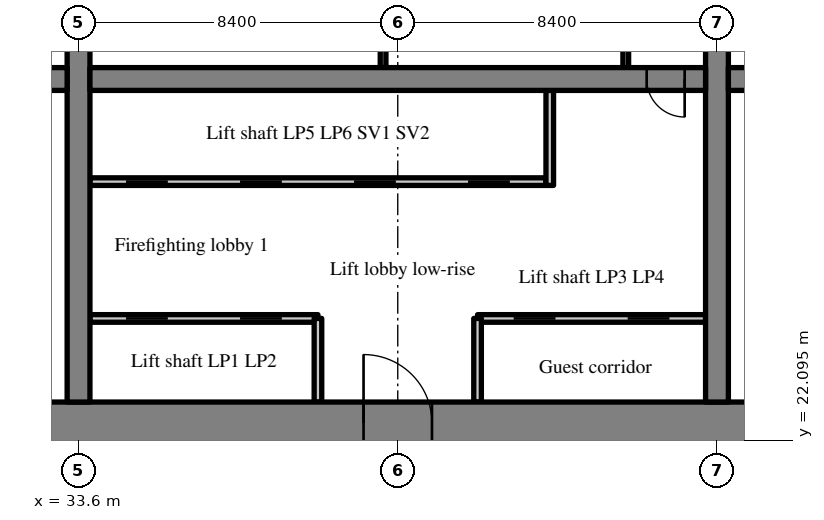
"""IFC4 building model, lengths in metres.
Left out: names, types, materials, properties, quantities, classifications, styles, units other than length and angle.
Written with IfcOpenShell. Run it as: python <this file> out.ifc"""

import sys

from ifc_helpers import new_model, si_unit, direction, frame, frame_2d, origin, place, context, subcontext, project, spatial, rectangle, extrude, source, transform, mapped, element, fill, save


model = new_model("IFC4")
c1 = context("Model", 3, precision=1e-05, world=origin(), true_north=direction((0.0, 1.0)))
c2 = subcontext(c1, "Body", "Model", "MODEL_VIEW")
j1 = project(units=[si_unit("LENGTHUNIT", "METRE"), si_unit("PLANEANGLEUNIT", "RADIAN")], contexts=[c1])
p1 = place(None, origin())
s1 = spatial("IfcSite", under=j1, at=p1, CompositionType="ELEMENT")
p2 = place(p1, origin())
s2 = spatial("IfcBuilding", under=s1, at=p2, CompositionType="ELEMENT")
p3 = place(p2, frame((0.0, 0.0, 31.6)))
s3 = spatial("IfcBuildingStorey", under=s2, at=p3, CompositionType="ELEMENT", Elevation=31.6)
m1 = source(origin(), c2, "Body", "SweptSolid", [
    extrude(rectangle(XDim=50.4, YDim=1.1, at=frame_2d((25.2, 0.0))), origin(), (0.0, 0.0, 1.0), 3.52),
])
p4 = place(p3, frame((25.2, 22.55, 0.0), z_axis=(0.0, 0.0, 1.0), x_axis=(1.0, 0.0, 0.0)))
e1 = element("IfcWall", 1, at=p4, inside=s3, PredefinedType="SHEAR", context=c2, shape_type="MappedRepresentation", body=[
    mapped(m1, transform((0.0, 0.0, 0.0), scale=1.0)),
])
m2 = source(origin(), c2, "Body", "SweptSolid", [
    extrude(rectangle(XDim=1.8, YDim=2.1, at=frame_2d((0.9, 1.05))), frame((0.0, 0.56, 0.0), z_axis=(0.0, -1.0, 0.0), x_axis=(1.0, 0.0, 0.0)), (0.0, 0.0, 1.0), 1.12),
])
p5 = place(p4, frame((15.9, 0.0, 0.0)))
e2 = element("IfcOpeningElement", 2, at=p5, cuts=e1, PredefinedType="OPENING", context=c2, shape_type="MappedRepresentation", body=[
    mapped(m2, transform((0.0, 0.0, 0.0), scale=1.0)),
])
m3 = source(origin(), c2, "Body", "SweptSolid", [
    extrude(rectangle(XDim=1.2, YDim=2.1, at=frame_2d((0.6, 1.05))), frame((0.0, 0.56, 0.0), z_axis=(0.0, -1.0, 0.0), x_axis=(1.0, 0.0, 0.0)), (0.0, 0.0, 1.0), 1.12),
])
p6 = place(p4, frame((27.0, 0.0, 0.0)))
e3 = element("IfcOpeningElement", 3, at=p6, cuts=e1, PredefinedType="OPENING", context=c2, shape_type="MappedRepresentation", body=[
    mapped(m3, transform((0.0, 0.0, 0.0), scale=1.0)),
])
m4 = source(origin(), c2, "Body", "SweptSolid", [
    extrude(rectangle(XDim=0.9, YDim=2.1, at=frame_2d((0.45, 1.05))), frame((0.0, 0.56, 0.0), z_axis=(0.0, -1.0, 0.0), x_axis=(1.0, 0.0, 0.0)), (0.0, 0.0, 1.0), 1.12),
])
p7 = place(p4, frame((32.25, 0.0, 0.0)))
e4 = element("IfcOpeningElement", 4, at=p7, cuts=e1, PredefinedType="OPENING", context=c2, shape_type="MappedRepresentation", body=[
    mapped(m4, transform((0.0, 0.0, 0.0), scale=1.0)),
])
p8 = place(p4, frame((38.25, 0.0, 0.0)))
e5 = element("IfcOpeningElement", 5, at=p8, cuts=e1, PredefinedType="OPENING", context=c2, shape_type="MappedRepresentation", body=[
    mapped(m4, transform((0.0, 0.0, 0.0), scale=1.0)),
])
p9 = place(p4, frame((6.425, 0.0, 0.0)))
e6 = element("IfcOpeningElement", 6, at=p9, cuts=e1, PredefinedType="OPENING", context=c2, shape_type="MappedRepresentation", body=[
    mapped(m3, transform((0.0, 0.0, 0.0), scale=1.0)),
])
p10 = place(p4, frame((47.675, 0.0, 0.0)))
e7 = element("IfcOpeningElement", 7, at=p10, cuts=e1, PredefinedType="OPENING", context=c2, shape_type="MappedRepresentation", body=[
    mapped(m3, transform((0.0, 0.0, 0.0), scale=1.0)),
])
m5 = source(origin(), c2, "Body", "SweptSolid", [
    extrude(rectangle(XDim=17.8, YDim=0.6, at=frame_2d((8.9, 0.0))), origin(), (0.0, 0.0, 1.0), 3.52),
])
p11 = place(p3, frame((33.6, 23.1, 0.0), z_axis=(0.0, 0.0, 1.0), x_axis=(0.0, 1.0, 0.0)))
e8 = element("IfcWall", 8, at=p11, inside=s3, PredefinedType="SHEAR", context=c2, shape_type="MappedRepresentation", body=[
    mapped(m5, transform((0.0, 0.0, 0.0), scale=1.0)),
])
m6 = source(origin(), c2, "Body", "SweptSolid", [
    extrude(rectangle(XDim=1.1, YDim=2.1, at=frame_2d((0.55, 1.05))), frame((0.0, 0.31, 0.0), z_axis=(0.0, -1.0, 0.0), x_axis=(1.0, 0.0, 0.0)), (0.0, 0.0, 1.0), 0.62),
])
p12 = place(p11, frame((12.35, 0.0, 0.0)))
e9 = element("IfcOpeningElement", 9, at=p12, cuts=e8, PredefinedType="OPENING", context=c2, shape_type="MappedRepresentation", body=[
    mapped(m6, transform((0.0, 0.0, 0.0), scale=1.0)),
])
p13 = place(p3, frame((50.4, 23.1, 0.0), z_axis=(0.0, 0.0, 1.0), x_axis=(0.0, 1.0, 0.0)))
e10 = element("IfcWall", 10, at=p13, inside=s3, PredefinedType="SHEAR", context=c2, shape_type="MappedRepresentation", body=[
    mapped(m5, transform((0.0, 0.0, 0.0), scale=1.0)),
])
p14 = place(p13, frame((12.35, 0.0, 0.0)))
e11 = element("IfcOpeningElement", 11, at=p14, cuts=e10, PredefinedType="OPENING", context=c2, shape_type="MappedRepresentation", body=[
    mapped(m6, transform((0.0, 0.0, 0.0), scale=1.0)),
])
m7 = source(origin(), c2, "Body", "SweptSolid", [
    extrude(rectangle(XDim=7.0, YDim=0.6, at=frame_2d((3.5, 0.0))), origin(), (0.0, 0.0, 1.0), 3.52),
])
p15 = place(p3, frame((26.3, 31.6, 0.0), z_axis=(0.0, 0.0, 1.0), x_axis=(1.0, 0.0, 0.0)))
e12 = element("IfcWall", 12, at=p15, inside=s3, PredefinedType="SHEAR", context=c2, shape_type="MappedRepresentation", body=[
    mapped(m7, transform((0.0, 0.0, 0.0), scale=1.0)),
])
p16 = place(p15, frame((5.375, 0.0, 0.0)))
e13 = element("IfcOpeningElement", 13, at=p16, cuts=e12, PredefinedType="OPENING", context=c2, shape_type="MappedRepresentation", body=[
    mapped(m6, transform((0.0, 0.0, 0.0), scale=1.0)),
])
m8 = source(origin(), c2, "Body", "SweptSolid", [
    extrude(rectangle(XDim=16.2, YDim=0.6, at=frame_2d((8.1, 0.0))), origin(), (0.0, 0.0, 1.0), 3.52),
])
p17 = place(p3, frame((33.9, 31.6, 0.0), z_axis=(0.0, 0.0, 1.0), x_axis=(1.0, 0.0, 0.0)))
e14 = element("IfcWall", 14, at=p17, inside=s3, PredefinedType="SHEAR", context=c2, shape_type="MappedRepresentation", body=[
    mapped(m8, transform((0.0, 0.0, 0.0), scale=1.0)),
])
m9 = source(origin(), c2, "Body", "SweptSolid", [
    extrude(rectangle(XDim=1.0, YDim=2.1, at=frame_2d((0.5, 1.05))), frame((0.0, 0.31, 0.0), z_axis=(0.0, -1.0, 0.0), x_axis=(1.0, 0.0, 0.0)), (0.0, 0.0, 1.0), 0.62),
])
p18 = place(p17, frame((14.65, 0.0, 0.0)))
e15 = element("IfcOpeningElement", 15, at=p18, cuts=e14, PredefinedType="OPENING", context=c2, shape_type="MappedRepresentation", body=[
    mapped(m9, transform((0.0, 0.0, 0.0), scale=1.0)),
])
m10 = source(origin(), c2, "Body", "SweptSolid", [
    extrude(rectangle(XDim=16.2, YDim=0.6, at=frame_2d((8.1, 0.0))), origin(), (0.0, 0.0, 1.0), 3.52),
])
p19 = place(p3, frame((50.7, 31.6, 0.0), z_axis=(0.0, 0.0, 1.0), x_axis=(1.0, 0.0, 0.0)))
e16 = element("IfcWall", 16, at=p19, inside=s3, PredefinedType="SHEAR", context=c2, shape_type="MappedRepresentation", body=[
    mapped(m10, transform((0.0, 0.0, 0.0), scale=1.0)),
])
p20 = place(p19, frame((0.55, 0.0, 0.0)))
e17 = element("IfcOpeningElement", 17, at=p20, cuts=e16, PredefinedType="OPENING", context=c2, shape_type="MappedRepresentation", body=[
    mapped(m9, transform((0.0, 0.0, 0.0), scale=1.0)),
])
m11 = source(origin(), c2, "Body", "SweptSolid", [
    extrude(rectangle(XDim=6.0, YDim=0.2, at=frame_2d((3.0, 0.0))), origin(), (0.0, 0.0, 1.0), 3.52),
])
p21 = place(p3, frame((33.9, 25.3, 0.0), z_axis=(0.0, 0.0, 1.0), x_axis=(1.0, 0.0, 0.0)))
e18 = element("IfcWall", 18, at=p21, inside=s3, PredefinedType="SOLIDWALL", context=c2, shape_type="MappedRepresentation", body=[
    mapped(m11, transform((0.0, 0.0, 0.0), scale=1.0)),
])
m12 = source(origin(), c2, "Body", "SweptSolid", [
    extrude(rectangle(XDim=1.1, YDim=2.1, at=frame_2d((0.55, 1.05))), frame((0.0, 0.11, 0.0), z_axis=(0.0, -1.0, 0.0), x_axis=(1.0, 0.0, 0.0)), (0.0, 0.0, 1.0), 0.22),
])
p22 = place(p21, frame((0.95, 0.0, 0.0)))
e19 = element("IfcOpeningElement", 19, at=p22, cuts=e18, PredefinedType="OPENING", context=c2, shape_type="MappedRepresentation", body=[
    mapped(m12, transform((0.0, 0.0, 0.0), scale=1.0)),
])
p23 = place(p21, frame((3.95, 0.0, 0.0)))
e20 = element("IfcOpeningElement", 20, at=p23, cuts=e18, PredefinedType="OPENING", context=c2, shape_type="MappedRepresentation", body=[
    mapped(m12, transform((0.0, 0.0, 0.0), scale=1.0)),
])
p24 = place(p3, frame((44.1, 25.3, 0.0), z_axis=(0.0, 0.0, 1.0), x_axis=(1.0, 0.0, 0.0)))
e21 = element("IfcWall", 21, at=p24, inside=s3, PredefinedType="SOLIDWALL", context=c2, shape_type="MappedRepresentation", body=[
    mapped(m11, transform((0.0, 0.0, 0.0), scale=1.0)),
])
p25 = place(p24, frame((0.95, 0.0, 0.0)))
e22 = element("IfcOpeningElement", 22, at=p25, cuts=e21, PredefinedType="OPENING", context=c2, shape_type="MappedRepresentation", body=[
    mapped(m12, transform((0.0, 0.0, 0.0), scale=1.0)),
])
p26 = place(p24, frame((3.95, 0.0, 0.0)))
e23 = element("IfcOpeningElement", 23, at=p26, cuts=e21, PredefinedType="OPENING", context=c2, shape_type="MappedRepresentation", body=[
    mapped(m12, transform((0.0, 0.0, 0.0), scale=1.0)),
])
m13 = source(origin(), c2, "Body", "SweptSolid", [
    extrude(rectangle(XDim=12.0, YDim=0.2, at=frame_2d((6.0, 0.0))), origin(), (0.0, 0.0, 1.0), 3.52),
])
p27 = place(p3, frame((33.9, 28.9, 0.0), z_axis=(0.0, 0.0, 1.0), x_axis=(1.0, 0.0, 0.0)))
e24 = element("IfcWall", 24, at=p27, inside=s3, PredefinedType="SOLIDWALL", context=c2, shape_type="MappedRepresentation", body=[
    mapped(m13, transform((0.0, 0.0, 0.0), scale=1.0)),
])
p28 = place(p27, frame((0.95, 0.0, 0.0)))
e25 = element("IfcOpeningElement", 25, at=p28, cuts=e24, PredefinedType="OPENING", context=c2, shape_type="MappedRepresentation", body=[
    mapped(m12, transform((0.0, 0.0, 0.0), scale=1.0)),
])
p29 = place(p27, frame((3.95, 0.0, 0.0)))
e26 = element("IfcOpeningElement", 26, at=p29, cuts=e24, PredefinedType="OPENING", context=c2, shape_type="MappedRepresentation", body=[
    mapped(m12, transform((0.0, 0.0, 0.0), scale=1.0)),
])
p30 = place(p27, frame((6.95, 0.0, 0.0)))
e27 = element("IfcOpeningElement", 27, at=p30, cuts=e24, PredefinedType="OPENING", context=c2, shape_type="MappedRepresentation", body=[
    mapped(m12, transform((0.0, 0.0, 0.0), scale=1.0)),
])
p31 = place(p27, frame((9.95, 0.0, 0.0)))
e28 = element("IfcOpeningElement", 28, at=p31, cuts=e24, PredefinedType="OPENING", context=c2, shape_type="MappedRepresentation", body=[
    mapped(m12, transform((0.0, 0.0, 0.0), scale=1.0)),
])
m14 = source(origin(), c2, "Body", "SweptSolid", [
    extrude(rectangle(XDim=2.2, YDim=0.2, at=frame_2d((1.1, 0.0))), origin(), (0.0, 0.0, 1.0), 3.52),
])
for number, where, z_axis, x_axis in (
    (29, (39.9, 23.1, 0.0), (0.0, 0.0, 1.0), (0.0, 1.0, 0.0)),
    (30, (44.1, 23.1, 0.0), (0.0, 0.0, 1.0), (0.0, 1.0, 0.0)),
):
    element("IfcWall", number, at=place(p3, frame(where, z_axis=z_axis, x_axis=x_axis)), inside=s3, PredefinedType="SOLIDWALL", context=c2, shape_type="MappedRepresentation", body=[
        mapped(m14, transform((0.0, 0.0, 0.0), scale=1.0)),
    ])
m15 = source(origin(), c2, "Body", "SweptSolid", [
    extrude(rectangle(XDim=2.5, YDim=0.2, at=frame_2d((1.25, 0.0))), origin(), (0.0, 0.0, 1.0), 3.52),
])
p32 = place(p3, frame((46.0, 28.8, 0.0), z_axis=(0.0, 0.0, 1.0), x_axis=(0.0, 1.0, 0.0)))
e31 = element("IfcWall", 31, at=p32, inside=s3, PredefinedType="SOLIDWALL", context=c2, shape_type="MappedRepresentation", body=[
    mapped(m15, transform((0.0, 0.0, 0.0), scale=1.0)),
])
m16 = source(origin(), c2, "Body", "SweptSolid", [
    extrude(rectangle(XDim=3.1, YDim=0.15, at=frame_2d((1.55, 0.0))), origin(), (0.0, 0.0, 1.0), 3.52),
])
for number, where, z_axis, x_axis in (
    (32, (48.0, 31.9, 0.0), (0.0, 0.0, 1.0), (0.0, 1.0, 0.0)),
    (33, (41.614, 31.9, 0.0), (0.0, 0.0, 1.0), (0.0, 1.0, 0.0)),
):
    element("IfcWall", number, at=place(p3, frame(where, z_axis=z_axis, x_axis=x_axis)), inside=s3, PredefinedType="PARTITIONING", context=c2, shape_type="MappedRepresentation", body=[
        mapped(m16, transform((0.0, 0.0, 0.0), scale=1.0)),
    ])
m17 = source(origin(), c2, "Body", "SweptSolid", [
    extrude(rectangle(XDim=1.8, YDim=2.1, at=frame_2d((0.9, 1.05))), frame((0.0, 0.325, 0.0), z_axis=(0.0, -1.0, 0.0), x_axis=(1.0, 0.0, 0.0)), (0.0, 0.0, 1.0), 0.05),
])
p33 = place(p5, origin())
e34 = element("IfcDoor", 34, at=p33, inside=s3, OperationType="DOUBLE_DOOR_SINGLE_SWING", PredefinedType="DOOR", context=c2, shape_type="MappedRepresentation", body=[
    mapped(m17, transform((0.0, 0.0, 0.0), scale=1.0)),
])
fill(e2, e34)
m18 = source(origin(), c2, "Body", "SweptSolid", [
    extrude(rectangle(XDim=1.0, YDim=2.1, at=frame_2d((0.5, 1.05))), frame((0.0, 0.025, 0.0), z_axis=(0.0, -1.0, 0.0), x_axis=(1.0, 0.0, 0.0)), (0.0, 0.0, 1.0), 0.05),
])
p34 = place(p18, origin())
e35 = element("IfcDoor", 35, at=p34, inside=s3, OperationType="SINGLE_SWING_RIGHT", PredefinedType="DOOR", context=c2, shape_type="MappedRepresentation", body=[
    mapped(m18, transform((0.0, 0.0, 0.0), scale=1.0)),
])
fill(e15, e35)
m19 = source(origin(), c2, "Body", "SweptSolid", [
    extrude(rectangle(XDim=1.1, YDim=2.1, at=frame_2d((0.55, 1.05))), frame((0.0, 0.025, 0.0), z_axis=(0.0, -1.0, 0.0), x_axis=(1.0, 0.0, 0.0)), (0.0, 0.0, 1.0), 0.05),
])
p35 = place(p22, origin())
e36 = element("IfcDoor", 36, at=p35, inside=s3, OperationType="SLIDING_TO_LEFT", PredefinedType="DOOR", context=c2, shape_type="MappedRepresentation", body=[
    mapped(m19, transform((0.0, 0.0, 0.0), scale=1.0)),
])
fill(e19, e36)
p36 = place(p23, origin())
e37 = element("IfcDoor", 37, at=p36, inside=s3, OperationType="SLIDING_TO_RIGHT", PredefinedType="DOOR", context=c2, shape_type="MappedRepresentation", body=[
    mapped(m19, transform((0.0, 0.0, 0.0), scale=1.0)),
])
fill(e20, e37)
p37 = place(p25, origin())
e38 = element("IfcDoor", 38, at=p37, inside=s3, OperationType="SLIDING_TO_LEFT", PredefinedType="DOOR", context=c2, shape_type="MappedRepresentation", body=[
    mapped(m19, transform((0.0, 0.0, 0.0), scale=1.0)),
])
fill(e22, e38)
p38 = place(p26, origin())
e39 = element("IfcDoor", 39, at=p38, inside=s3, OperationType="SLIDING_TO_RIGHT", PredefinedType="DOOR", context=c2, shape_type="MappedRepresentation", body=[
    mapped(m19, transform((0.0, 0.0, 0.0), scale=1.0)),
])
fill(e23, e39)
p39 = place(p28, origin())
e40 = element("IfcDoor", 40, at=p39, inside=s3, OperationType="SLIDING_TO_LEFT", PredefinedType="DOOR", context=c2, shape_type="MappedRepresentation", body=[
    mapped(m19, transform((0.0, 0.0, 0.0), scale=1.0)),
])
fill(e25, e40)
p40 = place(p29, origin())
e41 = element("IfcDoor", 41, at=p40, inside=s3, OperationType="SLIDING_TO_RIGHT", PredefinedType="DOOR", context=c2, shape_type="MappedRepresentation", body=[
    mapped(m19, transform((0.0, 0.0, 0.0), scale=1.0)),
])
fill(e26, e41)
p41 = place(p30, origin())
e42 = element("IfcDoor", 42, at=p41, inside=s3, OperationType="SLIDING_TO_LEFT", PredefinedType="DOOR", context=c2, shape_type="MappedRepresentation", body=[
    mapped(m19, transform((0.0, 0.0, 0.0), scale=1.0)),
])
fill(e27, e42)
p42 = place(p31, origin())
e43 = element("IfcDoor", 43, at=p42, inside=s3, OperationType="SLIDING_TO_RIGHT", PredefinedType="DOOR", context=c2, shape_type="MappedRepresentation", body=[
    mapped(m19, transform((0.0, 0.0, 0.0), scale=1.0)),
])
fill(e28, e43)
save(model, sys.argv[1])
